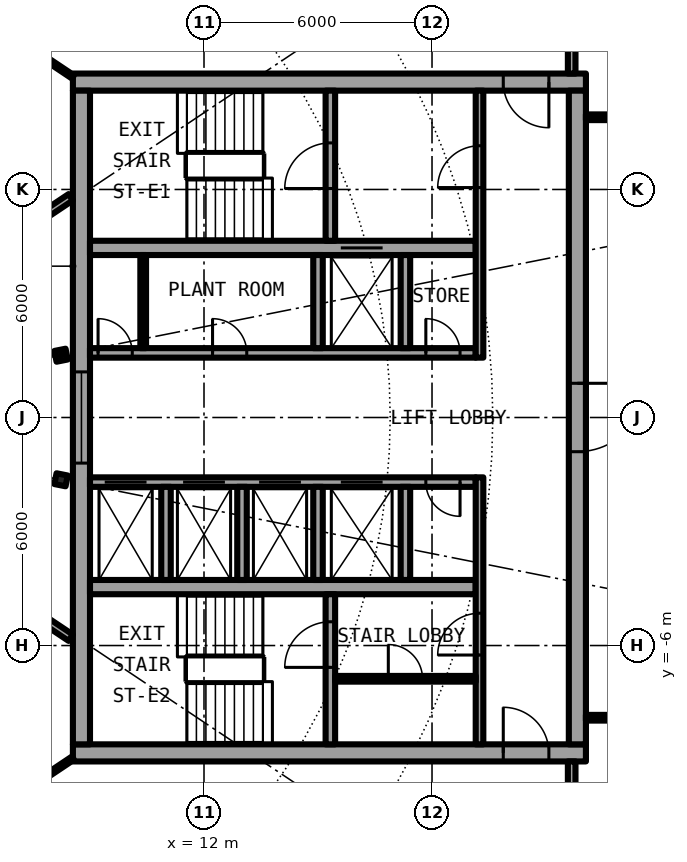
"""IFC4 building model, lengths in metres.
Left out: names, types, materials, properties, quantities, classifications, styles, units other than length and angle.
Written with IfcOpenShell. Run it as: python <this file> out.ifc"""

import sys

from ifc_helpers import new_model, si_unit, direction, frame, frame_2d, origin, origin_2d, place, context, subcontext, project, spatial, rectangle, i_section, extrude, element, fill, save


model = new_model("IFC4")
c1 = context("Model", 3, precision=1e-05, world=origin(), true_north=direction((0.0, 1.0)))
c2 = subcontext(c1, "Body", "Model", "MODEL_VIEW")
j1 = project(units=[si_unit("LENGTHUNIT", "METRE"), si_unit("PLANEANGLEUNIT", "RADIAN")], contexts=[c1])
p1 = place(None, origin())
s1 = spatial("IfcSite", under=j1, at=p1, CompositionType="ELEMENT")
p2 = place(p1, origin())
s2 = spatial("IfcBuilding", under=s1, at=p2, CompositionType="ELEMENT")
p3 = place(p2, frame((0.0, 0.0, 218.8)))
s3 = spatial("IfcBuildingStorey", under=s2, at=p3, CompositionType="ELEMENT", Elevation=218.8)
for number, where, z_axis, x_axis in (
    (1, (8.239, 1.639, 0.0), (0.0, 0.0, 1.0), (0.981, 0.195, 0.0)),
    (2, (8.239, -1.639, 0.0), (0.0, 0.0, 1.0), (0.981, -0.195, 0.0)),
):
    element("IfcColumn", number, at=place(p3, frame(where, z_axis=z_axis, x_axis=x_axis)), inside=s3, PredefinedType="COLUMN", context=c2, shape_type="SweptSolid", body=[
        extrude(i_section(OverallWidth=0.3, OverallDepth=0.29, WebThickness=0.009, FlangeThickness=0.014, FilletRadius=0.027, at=origin_2d()), origin(), (0.0, 0.0, 1.0), 3.05),
    ])
p4 = place(p3, frame((22.05, 8.825, 0.0), z_axis=(0.0, 0.0, 1.0), x_axis=(-1.0, 0.0, 0.0)))
e3 = element("IfcWall", 3, at=p4, inside=s3, PredefinedType="SHEAR", context=c2, shape_type="SweptSolid", body=[
    extrude(rectangle(XDim=13.5, YDim=0.45, at=frame_2d((6.75, 0.0))), origin(), (0.0, 0.0, 1.0), 3.05),
])
p5 = place(p4, frame((0.975, 0.0, 0.0)))
e4 = element("IfcOpeningElement", 4, at=p5, cuts=e3, PredefinedType="OPENING", context=c2, shape_type="SweptSolid", body=[
    extrude(rectangle(XDim=1.2, YDim=2.3, at=frame_2d((0.6, 1.15))), frame((0.0, 0.235, 0.0), z_axis=(0.0, -1.0, 0.0), x_axis=(1.0, 0.0, 0.0)), (0.0, 0.0, 1.0), 0.47),
])
p6 = place(p3, frame((8.55, -8.825, 0.0), z_axis=(0.0, 0.0, 1.0), x_axis=(1.0, 0.0, 0.0)))
e5 = element("IfcWall", 5, at=p6, inside=s3, PredefinedType="SHEAR", context=c2, shape_type="SweptSolid", body=[
    extrude(rectangle(XDim=13.5, YDim=0.45, at=frame_2d((6.75, 0.0))), origin(), (0.0, 0.0, 1.0), 3.05),
])
p7 = place(p6, frame((11.325, 0.0, 0.0)))
e6 = element("IfcOpeningElement", 6, at=p7, cuts=e5, PredefinedType="OPENING", context=c2, shape_type="SweptSolid", body=[
    extrude(rectangle(XDim=1.2, YDim=2.3, at=frame_2d((0.6, 1.15))), frame((0.0, 0.235, 0.0), z_axis=(0.0, -1.0, 0.0), x_axis=(1.0, 0.0, 0.0)), (0.0, 0.0, 1.0), 0.47),
])
p8 = place(p3, frame((21.825, 8.6, 0.0), z_axis=(0.0, 0.0, 1.0), x_axis=(0.0, -1.0, 0.0)))
e7 = element("IfcWall", 7, at=p8, inside=s3, PredefinedType="SHEAR", context=c2, shape_type="SweptSolid", body=[
    extrude(rectangle(XDim=17.2, YDim=0.45, at=frame_2d((8.6, 0.0))), origin(), (0.0, 0.0, 1.0), 3.05),
])
p9 = place(p8, frame((7.7, 0.0, 0.0)))
e8 = element("IfcOpeningElement", 8, at=p9, cuts=e7, PredefinedType="OPENING", context=c2, shape_type="SweptSolid", body=[
    extrude(rectangle(XDim=1.8, YDim=2.3, at=frame_2d((0.9, 1.15))), frame((0.0, 0.235, 0.0), z_axis=(0.0, -1.0, 0.0), x_axis=(1.0, 0.0, 0.0)), (0.0, 0.0, 1.0), 0.47),
])
p10 = place(p3, frame((8.775, -8.6, 0.0), z_axis=(0.0, 0.0, 1.0), x_axis=(0.0, 1.0, 0.0)))
e9 = element("IfcWall", 9, at=p10, inside=s3, PredefinedType="SHEAR", context=c2, shape_type="SweptSolid", body=[
    extrude(rectangle(XDim=17.2, YDim=0.45, at=frame_2d((8.6, 0.0))), origin(), (0.0, 0.0, 1.0), 3.05),
])
p11 = place(p10, frame((7.4, 0.0, 0.1)))
e10 = element("IfcOpeningElement", 10, at=p11, cuts=e9, PredefinedType="OPENING", context=c2, shape_type="SweptSolid", body=[
    extrude(rectangle(XDim=2.4, YDim=2.2, at=frame_2d((1.2, 1.1))), frame((0.0, 0.235, 0.0), z_axis=(0.0, -1.0, 0.0), x_axis=(1.0, 0.0, 0.0)), (0.0, 0.0, 1.0), 0.47),
])
p12 = place(p3, frame((9.0, 1.7, 0.0), z_axis=(0.0, 0.0, 1.0), x_axis=(1.0, 0.0, 0.0)))
e11 = element("IfcWall", 11, at=p12, inside=s3, PredefinedType="SHEAR", context=c2, shape_type="SweptSolid", body=[
    extrude(rectangle(XDim=10.15, YDim=0.25, at=frame_2d((5.075, 0.0))), origin(), (0.0, 0.0, 1.0), 3.05),
])
p13 = place(p12, frame((0.212, 0.0, 0.0)))
e12 = element("IfcOpeningElement", 12, at=p13, cuts=e11, PredefinedType="OPENING", context=c2, shape_type="SweptSolid", body=[
    extrude(rectangle(XDim=0.9, YDim=2.3, at=frame_2d((0.45, 1.15))), frame((0.0, 0.135, 0.0), z_axis=(0.0, -1.0, 0.0), x_axis=(1.0, 0.0, 0.0)), (0.0, 0.0, 1.0), 0.27),
])
p14 = place(p12, frame((3.225, 0.0, 0.0)))
e13 = element("IfcOpeningElement", 13, at=p14, cuts=e11, PredefinedType="OPENING", context=c2, shape_type="SweptSolid", body=[
    extrude(rectangle(XDim=0.9, YDim=2.3, at=frame_2d((0.45, 1.15))), frame((0.0, 0.135, 0.0), z_axis=(0.0, -1.0, 0.0), x_axis=(1.0, 0.0, 0.0)), (0.0, 0.0, 1.0), 0.27),
])
p15 = place(p12, frame((8.837, 0.0, 0.0)))
e14 = element("IfcOpeningElement", 14, at=p15, cuts=e11, PredefinedType="OPENING", context=c2, shape_type="SweptSolid", body=[
    extrude(rectangle(XDim=0.9, YDim=2.3, at=frame_2d((0.45, 1.15))), frame((0.0, 0.135, 0.0), z_axis=(0.0, -1.0, 0.0), x_axis=(1.0, 0.0, 0.0)), (0.0, 0.0, 1.0), 0.27),
])
p16 = place(p3, frame((9.0, 4.462, 0.0), z_axis=(0.0, 0.0, 1.0), x_axis=(1.0, 0.0, 0.0)))
e15 = element("IfcWall", 15, at=p16, inside=s3, PredefinedType="SHEAR", context=c2, shape_type="SweptSolid", body=[
    extrude(rectangle(XDim=10.15, YDim=0.375, at=frame_2d((5.075, 0.0))), origin(), (0.0, 0.0, 1.0), 3.05),
])
p17 = place(p16, frame((6.6, 0.0, 0.0)))
e16 = element("IfcOpeningElement", 16, at=p17, cuts=e15, PredefinedType="OPENING", context=c2, shape_type="SweptSolid", body=[
    extrude(rectangle(XDim=1.1, YDim=2.3, at=frame_2d((0.55, 1.15))), frame((0.0, 0.198, 0.0), z_axis=(0.0, -1.0, 0.0), x_axis=(1.0, 0.0, 0.0)), (0.0, 0.0, 1.0), 0.395),
])
p18 = place(p3, frame((15.325, 4.65, 0.0), z_axis=(0.0, 0.0, 1.0), x_axis=(0.0, 1.0, 0.0)))
e17 = element("IfcWall", 17, at=p18, inside=s3, PredefinedType="SHEAR", context=c2, shape_type="SweptSolid", body=[
    extrude(rectangle(XDim=3.95, YDim=0.25, at=frame_2d((1.975, 0.0))), origin(), (0.0, 0.0, 1.0), 3.05),
])
p19 = place(p18, frame((1.375, 0.0, 0.0)))
e18 = element("IfcOpeningElement", 18, at=p19, cuts=e17, PredefinedType="OPENING", context=c2, shape_type="SweptSolid", body=[
    extrude(rectangle(XDim=1.2, YDim=2.3, at=frame_2d((0.6, 1.15))), frame((0.0, 0.135, 0.0), z_axis=(0.0, -1.0, 0.0), x_axis=(1.0, 0.0, 0.0)), (0.0, 0.0, 1.0), 0.27),
])
for number, where, z_axis, x_axis in (
    (19, (15.0, 1.825, 0.0), (0.0, 0.0, 1.0), (0.0, 1.0, 0.0)),
    (20, (17.3, 1.825, 0.0), (0.0, 0.0, 1.0), (0.0, 1.0, 0.0)),
):
    element("IfcWall", number, at=place(p3, frame(where, z_axis=z_axis, x_axis=x_axis)), inside=s3, PredefinedType="SOLIDWALL", context=c2, shape_type="SweptSolid", body=[
        extrude(rectangle(XDim=2.45, YDim=0.25, at=frame_2d((1.225, 0.0))), origin(), (0.0, 0.0, 1.0), 2.65),
    ])
p20 = place(p3, frame((19.25, 1.575, 0.0), z_axis=(0.0, 0.0, 1.0), x_axis=(0.0, 1.0, 0.0)))
e21 = element("IfcWall", 21, at=p20, inside=s3, PredefinedType="SOLIDWALL", context=c2, shape_type="SweptSolid", body=[
    extrude(rectangle(XDim=7.025, YDim=0.2, at=frame_2d((3.513, 0.0))), origin(), (0.0, 0.0, 1.0), 2.65),
])
p21 = place(p20, frame((4.475, 0.0, 0.0)))
e22 = element("IfcOpeningElement", 22, at=p21, cuts=e21, PredefinedType="OPENING", context=c2, shape_type="SweptSolid", body=[
    extrude(rectangle(XDim=1.1, YDim=2.3, at=frame_2d((0.55, 1.15))), frame((0.0, 0.11, 0.0), z_axis=(0.0, -1.0, 0.0), x_axis=(1.0, 0.0, 0.0)), (0.0, 0.0, 1.0), 0.22),
])
p22 = place(p3, frame((19.15, -1.7, 0.0), z_axis=(0.0, 0.0, 1.0), x_axis=(-1.0, 0.0, 0.0)))
e23 = element("IfcWall", 23, at=p22, inside=s3, PredefinedType="SHEAR", context=c2, shape_type="SweptSolid", body=[
    extrude(rectangle(XDim=10.15, YDim=0.25, at=frame_2d((5.075, 0.0))), origin(), (0.0, 0.0, 1.0), 3.05),
])
p23 = place(p22, frame((8.663, 0.0, 0.0)))
e24 = element("IfcOpeningElement", 24, at=p23, cuts=e23, PredefinedType="OPENING", context=c2, shape_type="SweptSolid", body=[
    extrude(rectangle(XDim=1.1, YDim=2.3, at=frame_2d((0.55, 1.15))), frame((0.0, 0.135, 0.0), z_axis=(0.0, -1.0, 0.0), x_axis=(1.0, 0.0, 0.0)), (0.0, 0.0, 1.0), 0.27),
])
p24 = place(p22, frame((6.6, 0.0, 0.0)))
e25 = element("IfcOpeningElement", 25, at=p24, cuts=e23, PredefinedType="OPENING", context=c2, shape_type="SweptSolid", body=[
    extrude(rectangle(XDim=1.1, YDim=2.3, at=frame_2d((0.55, 1.15))), frame((0.0, 0.135, 0.0), z_axis=(0.0, -1.0, 0.0), x_axis=(1.0, 0.0, 0.0)), (0.0, 0.0, 1.0), 0.27),
])
p25 = place(p22, frame((4.6, 0.0, 0.0)))
e26 = element("IfcOpeningElement", 26, at=p25, cuts=e23, PredefinedType="OPENING", context=c2, shape_type="SweptSolid", body=[
    extrude(rectangle(XDim=1.1, YDim=2.3, at=frame_2d((0.55, 1.15))), frame((0.0, 0.135, 0.0), z_axis=(0.0, -1.0, 0.0), x_axis=(1.0, 0.0, 0.0)), (0.0, 0.0, 1.0), 0.27),
])
p26 = place(p22, frame((2.45, 0.0, 0.0)))
e27 = element("IfcOpeningElement", 27, at=p26, cuts=e23, PredefinedType="OPENING", context=c2, shape_type="SweptSolid", body=[
    extrude(rectangle(XDim=1.1, YDim=2.3, at=frame_2d((0.55, 1.15))), frame((0.0, 0.135, 0.0), z_axis=(0.0, -1.0, 0.0), x_axis=(1.0, 0.0, 0.0)), (0.0, 0.0, 1.0), 0.27),
])
p27 = place(p22, frame((0.413, 0.0, 0.0)))
e28 = element("IfcOpeningElement", 28, at=p27, cuts=e23, PredefinedType="OPENING", context=c2, shape_type="SweptSolid", body=[
    extrude(rectangle(XDim=0.9, YDim=2.3, at=frame_2d((0.45, 1.15))), frame((0.0, 0.135, 0.0), z_axis=(0.0, -1.0, 0.0), x_axis=(1.0, 0.0, 0.0)), (0.0, 0.0, 1.0), 0.27),
])
p28 = place(p3, frame((9.0, -4.462, 0.0), z_axis=(0.0, 0.0, 1.0), x_axis=(1.0, 0.0, 0.0)))
e29 = element("IfcWall", 29, at=p28, inside=s3, PredefinedType="SHEAR", context=c2, shape_type="SweptSolid", body=[
    extrude(rectangle(XDim=10.15, YDim=0.375, at=frame_2d((5.075, 0.0))), origin(), (0.0, 0.0, 1.0), 3.05),
])
p29 = place(p3, frame((15.325, -8.6, 0.0), z_axis=(0.0, 0.0, 1.0), x_axis=(0.0, 1.0, 0.0)))
e30 = element("IfcWall", 30, at=p29, inside=s3, PredefinedType="SHEAR", context=c2, shape_type="SweptSolid", body=[
    extrude(rectangle(XDim=3.95, YDim=0.25, at=frame_2d((1.975, 0.0))), origin(), (0.0, 0.0, 1.0), 3.05),
])
p30 = place(p29, frame((2.025, 0.0, 0.0)))
e31 = element("IfcOpeningElement", 31, at=p30, cuts=e30, PredefinedType="OPENING", context=c2, shape_type="SweptSolid", body=[
    extrude(rectangle(XDim=1.2, YDim=2.3, at=frame_2d((0.6, 1.15))), frame((0.0, 0.135, 0.0), z_axis=(0.0, -1.0, 0.0), x_axis=(1.0, 0.0, 0.0)), (0.0, 0.0, 1.0), 0.27),
])
for number, where, z_axis, x_axis in (
    (32, (15.0, -1.825, 0.0), (0.0, 0.0, 1.0), (0.0, -1.0, 0.0)),
    (33, (17.3, -1.825, 0.0), (0.0, 0.0, 1.0), (0.0, -1.0, 0.0)),
):
    element("IfcWall", number, at=place(p3, frame(where, z_axis=z_axis, x_axis=x_axis)), inside=s3, PredefinedType="SOLIDWALL", context=c2, shape_type="SweptSolid", body=[
        extrude(rectangle(XDim=2.45, YDim=0.25, at=frame_2d((1.225, 0.0))), origin(), (0.0, 0.0, 1.0), 2.65),
    ])
p31 = place(p3, frame((19.25, -8.6, 0.0), z_axis=(0.0, 0.0, 1.0), x_axis=(0.0, 1.0, 0.0)))
e34 = element("IfcWall", 34, at=p31, inside=s3, PredefinedType="SOLIDWALL", context=c2, shape_type="SweptSolid", body=[
    extrude(rectangle(XDim=7.025, YDim=0.2, at=frame_2d((3.513, 0.0))), origin(), (0.0, 0.0, 1.0), 2.65),
])
p32 = place(p31, frame((2.35, 0.0, 0.0)))
e35 = element("IfcOpeningElement", 35, at=p32, cuts=e34, PredefinedType="OPENING", context=c2, shape_type="SweptSolid", body=[
    extrude(rectangle(XDim=1.1, YDim=2.3, at=frame_2d((0.55, 1.15))), frame((0.0, 0.11, 0.0), z_axis=(0.0, -1.0, 0.0), x_axis=(1.0, 0.0, 0.0)), (0.0, 0.0, 1.0), 0.22),
])
for number, where, z_axis, x_axis in (
    (36, (11.0, -1.825, 0.0), (0.0, 0.0, 1.0), (0.0, -1.0, 0.0)),
    (37, (13.0, -1.825, 0.0), (0.0, 0.0, 1.0), (0.0, -1.0, 0.0)),
):
    element("IfcWall", number, at=place(p3, frame(where, z_axis=z_axis, x_axis=x_axis)), inside=s3, PredefinedType="SOLIDWALL", context=c2, shape_type="SweptSolid", body=[
        extrude(rectangle(XDim=2.45, YDim=0.25, at=frame_2d((1.225, 0.0))), origin(), (0.0, 0.0, 1.0), 2.65),
    ])
p33 = place(p3, frame((10.4, 1.825, 0.0), z_axis=(0.0, 0.0, 1.0), x_axis=(0.0, 1.0, 0.0)))
e38 = element("IfcWall", 38, at=p33, inside=s3, PredefinedType="PARTITIONING", context=c2, shape_type="SweptSolid", body=[
    extrude(rectangle(XDim=2.45, YDim=0.15, at=frame_2d((1.225, 0.0))), origin(), (0.0, 0.0, 1.0), 2.65),
])
p34 = place(p3, frame((15.45, -6.875, 0.0), z_axis=(0.0, 0.0, 1.0), x_axis=(1.0, 0.0, 0.0)))
e39 = element("IfcWall", 39, at=p34, inside=s3, PredefinedType="PARTITIONING", context=c2, shape_type="SweptSolid", body=[
    extrude(rectangle(XDim=3.7, YDim=0.15, at=frame_2d((1.85, 0.0))), origin(), (0.0, 0.0, 1.0), 2.65),
])
p35 = place(p34, frame((1.4, 0.0, 0.0)))
e40 = element("IfcOpeningElement", 40, at=p35, cuts=e39, PredefinedType="OPENING", context=c2, shape_type="SweptSolid", body=[
    extrude(rectangle(XDim=0.9, YDim=2.3, at=frame_2d((0.45, 1.15))), frame((0.0, 0.085, 0.0), z_axis=(0.0, -1.0, 0.0), x_axis=(1.0, 0.0, 0.0)), (0.0, 0.0, 1.0), 0.17),
])
for number, where, z_axis, x_axis in (
    (41, (22.05, -7.9, 0.0), (0.0, 0.0, 1.0), (1.0, 0.0, 0.0)),
    (42, (22.05, 7.9, 0.0), (0.0, 0.0, 1.0), (1.0, 0.0, 0.0)),
):
    element("IfcWall", number, at=place(p3, frame(where, z_axis=z_axis, x_axis=x_axis)), inside=s3, PredefinedType="PARTITIONING", context=c2, shape_type="SweptSolid", body=[
        extrude(rectangle(XDim=2.89, YDim=0.15, at=frame_2d((1.445, 0.0))), origin(), (0.0, 0.0, 1.0), 2.65),
    ])
for number, where, z_axis, x_axis in (
    (43, (21.675, -10.825, 0.0), (0.0, 0.0, 1.0), (0.0, 1.0, 0.0)),
    (44, (21.675, 9.05, 0.0), (0.0, 0.0, 1.0), (0.0, 1.0, 0.0)),
):
    element("IfcWall", number, at=place(p3, frame(where, z_axis=z_axis, x_axis=x_axis)), inside=s3, PredefinedType="PARTITIONING", context=c2, shape_type="SweptSolid", body=[
        extrude(rectangle(XDim=1.775, YDim=0.2, at=frame_2d((0.887, 0.0))), origin(), (0.0, 0.0, 1.0), 2.65),
    ])
p36 = place(p3, frame((5.73, -10.849, 0.0), z_axis=(0.0, 0.0, 1.0), x_axis=(0.83129689803, 0.555828631257, 0.0)))
e45 = element("IfcWall", 45, at=p36, inside=s3, PredefinedType="PARTITIONING", context=c2, shape_type="SweptSolid", body=[
    extrude(rectangle(XDim=3.394, YDim=0.1, at=frame_2d((1.697, 0.0))), origin(), (0.0, 0.0, 1.0), 2.65),
])
for number, where, z_axis, x_axis in (
    (46, (6.513, -4.472, 0.0), (0.0, 0.0, 1.0), (0.831, -0.556, 0.0)),
    (47, (6.513, 4.472, 0.0), (0.0, 0.0, 1.0), (0.831, 0.556, 0.0)),
):
    element("IfcWall", number, at=place(p3, frame(where, z_axis=z_axis, x_axis=x_axis)), inside=s3, PredefinedType="PARTITIONING", context=c2, shape_type="SweptSolid", body=[
        extrude(rectangle(XDim=2.383, YDim=0.2, at=frame_2d((1.191, 0.0))), origin(), (0.0, 0.0, 1.0), 2.65),
    ])
p37 = place(p3, frame((5.729, 10.849, 0.0), z_axis=(0.0, 0.0, 1.0), x_axis=(0.83129689803, -0.555828631257, 0.0)))
e48 = element("IfcWall", 48, at=p37, inside=s3, PredefinedType="PARTITIONING", context=c2, shape_type="SweptSolid", body=[
    extrude(rectangle(XDim=3.394, YDim=0.1, at=frame_2d((1.697, 0.0))), origin(), (0.0, 0.0, 1.0), 2.65),
])
p38 = place(p17, origin())
e49 = element("IfcDoor", 49, at=p38, inside=s3, OperationType="DOUBLE_DOOR_SLIDING", PredefinedType="DOOR", context=c2, shape_type="SweptSolid", body=[
    extrude(rectangle(XDim=1.1, YDim=2.3, at=frame_2d((0.55, 1.15))), frame((0.0, 0.025, 0.0), z_axis=(0.0, -1.0, 0.0), x_axis=(1.0, 0.0, 0.0)), (0.0, 0.0, 1.0), 0.05),
])
fill(e16, e49)
p39 = place(p23, origin())
e50 = element("IfcDoor", 50, at=p39, inside=s3, OperationType="DOUBLE_DOOR_SLIDING", PredefinedType="DOOR", context=c2, shape_type="SweptSolid", body=[
    extrude(rectangle(XDim=1.1, YDim=2.3, at=frame_2d((0.55, 1.15))), frame((0.0, 0.025, 0.0), z_axis=(0.0, -1.0, 0.0), x_axis=(1.0, 0.0, 0.0)), (0.0, 0.0, 1.0), 0.05),
])
fill(e24, e50)
p40 = place(p24, origin())
e51 = element("IfcDoor", 51, at=p40, inside=s3, OperationType="DOUBLE_DOOR_SLIDING", PredefinedType="DOOR", context=c2, shape_type="SweptSolid", body=[
    extrude(rectangle(XDim=1.1, YDim=2.3, at=frame_2d((0.55, 1.15))), frame((0.0, 0.025, 0.0), z_axis=(0.0, -1.0, 0.0), x_axis=(1.0, 0.0, 0.0)), (0.0, 0.0, 1.0), 0.05),
])
fill(e25, e51)
p41 = place(p25, origin())
e52 = element("IfcDoor", 52, at=p41, inside=s3, OperationType="DOUBLE_DOOR_SLIDING", PredefinedType="DOOR", context=c2, shape_type="SweptSolid", body=[
    extrude(rectangle(XDim=1.1, YDim=2.3, at=frame_2d((0.55, 1.15))), frame((0.0, 0.025, 0.0), z_axis=(0.0, -1.0, 0.0), x_axis=(1.0, 0.0, 0.0)), (0.0, 0.0, 1.0), 0.05),
])
fill(e26, e52)
p42 = place(p26, origin())
e53 = element("IfcDoor", 53, at=p42, inside=s3, OperationType="DOUBLE_DOOR_SLIDING", PredefinedType="DOOR", context=c2, shape_type="SweptSolid", body=[
    extrude(rectangle(XDim=1.1, YDim=2.3, at=frame_2d((0.55, 1.15))), frame((0.0, 0.025, 0.0), z_axis=(0.0, -1.0, 0.0), x_axis=(1.0, 0.0, 0.0)), (0.0, 0.0, 1.0), 0.05),
])
fill(e27, e53)
p43 = place(p13, origin())
e54 = element("IfcDoor", 54, at=p43, inside=s3, OperationType="SINGLE_SWING_RIGHT", PredefinedType="DOOR", context=c2, shape_type="SweptSolid", body=[
    extrude(rectangle(XDim=0.9, YDim=2.3, at=frame_2d((0.45, 1.15))), frame((0.0, 0.025, 0.0), z_axis=(0.0, -1.0, 0.0), x_axis=(1.0, 0.0, 0.0)), (0.0, 0.0, 1.0), 0.05),
])
fill(e12, e54)
p44 = place(p14, origin())
e55 = element("IfcDoor", 55, at=p44, inside=s3, OperationType="SINGLE_SWING_RIGHT", PredefinedType="DOOR", context=c2, shape_type="SweptSolid", body=[
    extrude(rectangle(XDim=0.9, YDim=2.3, at=frame_2d((0.45, 1.15))), frame((0.0, 0.025, 0.0), z_axis=(0.0, -1.0, 0.0), x_axis=(1.0, 0.0, 0.0)), (0.0, 0.0, 1.0), 0.05),
])
fill(e13, e55)
p45 = place(p15, origin())
e56 = element("IfcDoor", 56, at=p45, inside=s3, OperationType="SINGLE_SWING_LEFT", PredefinedType="DOOR", context=c2, shape_type="SweptSolid", body=[
    extrude(rectangle(XDim=0.9, YDim=2.3, at=frame_2d((0.45, 1.15))), frame((0.0, 0.025, 0.0), z_axis=(0.0, -1.0, 0.0), x_axis=(1.0, 0.0, 0.0)), (0.0, 0.0, 1.0), 0.05),
])
fill(e14, e56)
p46 = place(p27, origin())
e57 = element("IfcDoor", 57, at=p46, inside=s3, OperationType="SINGLE_SWING_RIGHT", PredefinedType="DOOR", context=c2, shape_type="SweptSolid", body=[
    extrude(rectangle(XDim=0.9, YDim=2.3, at=frame_2d((0.45, 1.15))), frame((0.0, 0.025, 0.0), z_axis=(0.0, -1.0, 0.0), x_axis=(1.0, 0.0, 0.0)), (0.0, 0.0, 1.0), 0.05),
])
fill(e28, e57)
p47 = place(p35, origin())
e58 = element("IfcDoor", 58, at=p47, inside=s3, OperationType="SINGLE_SWING_LEFT", PredefinedType="DOOR", context=c2, shape_type="SweptSolid", body=[
    extrude(rectangle(XDim=0.9, YDim=2.3, at=frame_2d((0.45, 1.15))), frame((0.0, 0.025, 0.0), z_axis=(0.0, -1.0, 0.0), x_axis=(1.0, 0.0, 0.0)), (0.0, 0.0, 1.0), 0.05),
])
fill(e40, e58)
p48 = place(p19, origin())
e59 = element("IfcDoor", 59, at=p48, inside=s3, OperationType="SINGLE_SWING_LEFT", PredefinedType="DOOR", context=c2, shape_type="SweptSolid", body=[
    extrude(rectangle(XDim=1.2, YDim=2.3, at=frame_2d((0.6, 1.15))), frame((0.0, 0.025, 0.0), z_axis=(0.0, -1.0, 0.0), x_axis=(1.0, 0.0, 0.0)), (0.0, 0.0, 1.0), 0.05),
])
fill(e18, e59)
p49 = place(p30, origin())
e60 = element("IfcDoor", 60, at=p49, inside=s3, OperationType="SINGLE_SWING_LEFT", PredefinedType="DOOR", context=c2, shape_type="SweptSolid", body=[
    extrude(rectangle(XDim=1.2, YDim=2.3, at=frame_2d((0.6, 1.15))), frame((0.0, 0.025, 0.0), z_axis=(0.0, -1.0, 0.0), x_axis=(1.0, 0.0, 0.0)), (0.0, 0.0, 1.0), 0.05),
])
fill(e31, e60)
p50 = place(p21, origin())
e61 = element("IfcDoor", 61, at=p50, inside=s3, OperationType="SINGLE_SWING_LEFT", PredefinedType="DOOR", context=c2, shape_type="SweptSolid", body=[
    extrude(rectangle(XDim=1.1, YDim=2.3, at=frame_2d((0.55, 1.15))), frame((0.0, 0.025, 0.0), z_axis=(0.0, -1.0, 0.0), x_axis=(1.0, 0.0, 0.0)), (0.0, 0.0, 1.0), 0.05),
])
fill(e22, e61)
p51 = place(p32, origin())
e62 = element("IfcDoor", 62, at=p51, inside=s3, OperationType="SINGLE_SWING_RIGHT", PredefinedType="DOOR", context=c2, shape_type="SweptSolid", body=[
    extrude(rectangle(XDim=1.1, YDim=2.3, at=frame_2d((0.55, 1.15))), frame((0.0, 0.025, 0.0), z_axis=(0.0, -1.0, 0.0), x_axis=(1.0, 0.0, 0.0)), (0.0, 0.0, 1.0), 0.05),
])
fill(e35, e62)
p52 = place(p5, origin())
e63 = element("IfcDoor", 63, at=p52, inside=s3, OperationType="SINGLE_SWING_RIGHT", PredefinedType="DOOR", context=c2, shape_type="SweptSolid", body=[
    extrude(rectangle(XDim=1.2, YDim=2.3, at=frame_2d((0.6, 1.15))), frame((0.0, 0.025, 0.0), z_axis=(0.0, -1.0, 0.0), x_axis=(1.0, 0.0, 0.0)), (0.0, 0.0, 1.0), 0.05),
])
fill(e4, e63)
p53 = place(p7, origin())
e64 = element("IfcDoor", 64, at=p53, inside=s3, OperationType="SINGLE_SWING_LEFT", PredefinedType="DOOR", context=c2, shape_type="SweptSolid", body=[
    extrude(rectangle(XDim=1.2, YDim=2.3, at=frame_2d((0.6, 1.15))), frame((0.0, 0.025, 0.0), z_axis=(0.0, -1.0, 0.0), x_axis=(1.0, 0.0, 0.0)), (0.0, 0.0, 1.0), 0.05),
])
fill(e6, e64)
p54 = place(p9, origin())
e65 = element("IfcDoor", 65, at=p54, inside=s3, OperationType="SINGLE_SWING_LEFT", PredefinedType="DOOR", context=c2, shape_type="SweptSolid", body=[
    extrude(rectangle(XDim=1.8, YDim=2.3, at=frame_2d((0.9, 1.15))), frame((0.0, 0.025, 0.0), z_axis=(0.0, -1.0, 0.0), x_axis=(1.0, 0.0, 0.0)), (0.0, 0.0, 1.0), 0.05),
])
fill(e8, e65)
p55 = place(p11, origin())
e66 = element("IfcWindow", 66, at=p55, inside=s3, PartitioningType="SINGLE_PANEL", PredefinedType="WINDOW", context=c2, shape_type="SweptSolid", body=[
    extrude(rectangle(XDim=2.4, YDim=2.2, at=frame_2d((1.2, 1.1))), frame((0.0, 0.03, 0.0), z_axis=(0.0, -1.0, 0.0), x_axis=(1.0, 0.0, 0.0)), (0.0, 0.0, 1.0), 0.06),
])
fill(e10, e66)
save(model, sys.argv[1])
